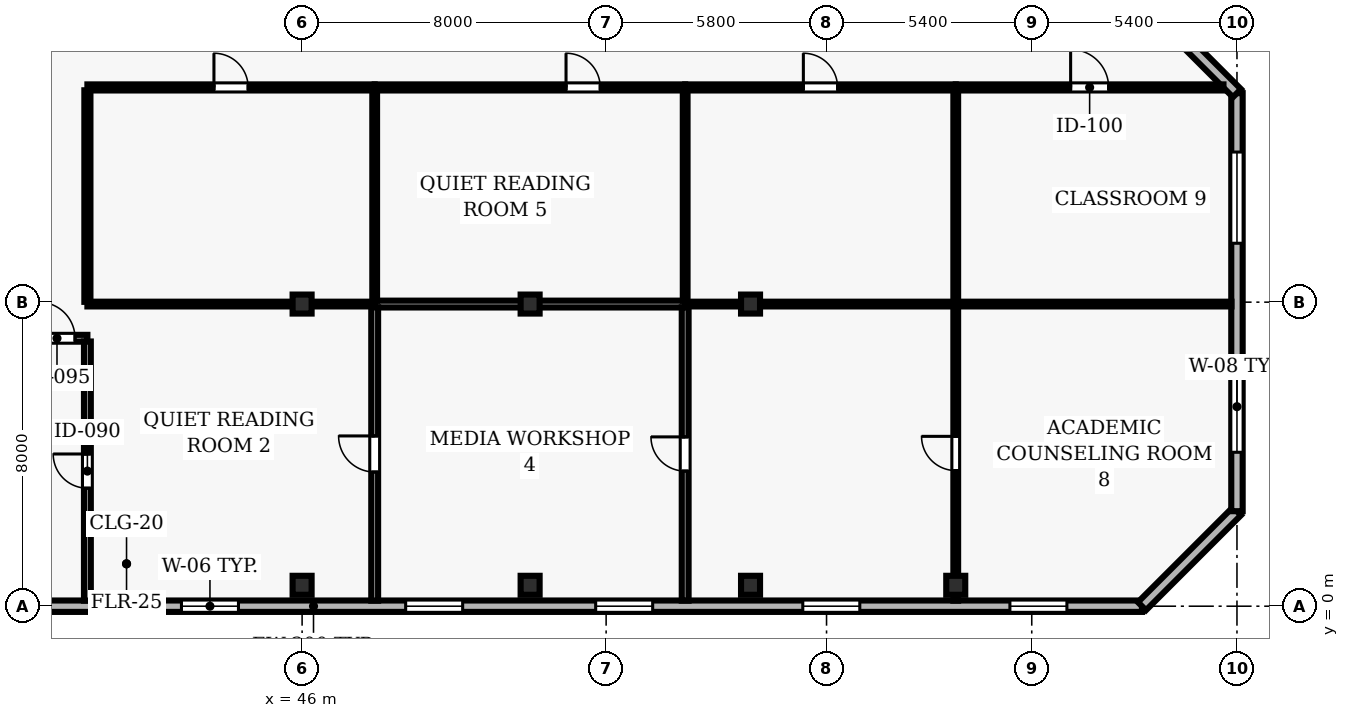
"""IFC4 building model, lengths in metres.
Left out: names, types, materials, properties, quantities, classifications, styles, units other than length and angle.
Written with IfcOpenShell. Run it as: python <this file> out.ifc"""

import sys

from ifc_helpers import new_model, si_unit, direction, frame, frame_2d, origin, origin_2d, place, context, subcontext, project, spatial, rectangle, hollow_rectangle, extrude, element, fill, save


model = new_model("IFC4")
c1 = context("Model", 3, precision=1e-05, world=origin(), true_north=direction((0.0, 1.0)))
c2 = subcontext(c1, "Body", "Model", "MODEL_VIEW")
j1 = project(units=[si_unit("LENGTHUNIT", "METRE"), si_unit("PLANEANGLEUNIT", "RADIAN")], contexts=[c1])
p1 = place(None, origin())
s1 = spatial("IfcSite", under=j1, at=p1, CompositionType="ELEMENT")
p2 = place(p1, origin())
s2 = spatial("IfcBuilding", under=s1, at=p2, CompositionType="ELEMENT")
p3 = place(p2, frame((0.0, 0.0, 122.9)))
s3 = spatial("IfcBuildingStorey", under=s2, at=p3, CompositionType="ELEMENT", Elevation=122.9)
for number, where, z_axis, x_axis in (
    (1, (46.0, 0.55, 0.0), (0.0, 0.0, 1.0), (1.0, 0.0, 0.0)),
    (2, (46.0, 7.95, 0.0), (0.0, 0.0, 1.0), (1.0, 0.0, 0.0)),
    (3, (52.0, 0.55, 0.0), (0.0, 0.0, 1.0), (1.0, 0.0, 0.0)),
    (4, (52.0, 7.95, 0.0), (0.0, 0.0, 1.0), (1.0, 0.0, 0.0)),
    (5, (57.8, 0.55, 0.0), (0.0, 0.0, 1.0), (1.0, 0.0, 0.0)),
    (6, (57.8, 7.95, 0.0), (0.0, 0.0, 1.0), (1.0, 0.0, 0.0)),
    (7, (63.2, 0.55, 0.0), (0.0, 0.0, 1.0), (1.0, 0.0, 0.0)),
):
    element("IfcColumn", number, at=place(p3, frame(where, z_axis=z_axis, x_axis=x_axis)), inside=s3, PredefinedType="COLUMN", context=c2, shape_type="SweptSolid", body=[
        extrude(hollow_rectangle(XDim=0.5, YDim=0.5, WallThickness=0.025, at=origin_2d()), origin(), (0.0, 0.0, 1.0), 3.9),
    ])
p4 = place(p3, frame((24.5, 0.0, 0.0), z_axis=(0.0, 0.0, 1.0), x_axis=(1.0, 0.0, 0.0)))
e8 = element("IfcWall", 8, at=p4, inside=s3, PredefinedType="SOLIDWALL", context=c2, shape_type="SweptSolid", body=[
    extrude(rectangle(XDim=43.6, YDim=0.3, at=frame_2d((21.8, 0.0))), origin(), (0.0, 0.0, 1.0), 3.69),
])
p5 = place(p4, frame((1.975, 0.0, 0.9)))
e9 = element("IfcOpeningElement", 9, at=p5, cuts=e8, PredefinedType="OPENING", context=c2, shape_type="SweptSolid", body=[
    extrude(rectangle(XDim=1.5, YDim=1.8, at=frame_2d((0.75, 0.9))), frame((0.0, 0.16, 0.0), z_axis=(0.0, -1.0, 0.0), x_axis=(1.0, 0.0, 0.0)), (0.0, 0.0, 1.0), 0.32),
])
p6 = place(p4, frame((8.325, 0.0, 0.9)))
e10 = element("IfcOpeningElement", 10, at=p6, cuts=e8, PredefinedType="OPENING", context=c2, shape_type="SweptSolid", body=[
    extrude(rectangle(XDim=1.5, YDim=1.8, at=frame_2d((0.75, 0.9))), frame((0.0, 0.16, 0.0), z_axis=(0.0, -1.0, 0.0), x_axis=(1.0, 0.0, 0.0)), (0.0, 0.0, 1.0), 0.32),
])
p7 = place(p4, frame((18.325, 0.0, 0.9)))
e11 = element("IfcOpeningElement", 11, at=p7, cuts=e8, PredefinedType="OPENING", context=c2, shape_type="SweptSolid", body=[
    extrude(rectangle(XDim=1.5, YDim=1.8, at=frame_2d((0.75, 0.9))), frame((0.0, 0.16, 0.0), z_axis=(0.0, -1.0, 0.0), x_axis=(1.0, 0.0, 0.0)), (0.0, 0.0, 1.0), 0.32),
])
p8 = place(p4, frame((24.225, 0.0, 0.9)))
e12 = element("IfcOpeningElement", 12, at=p8, cuts=e8, PredefinedType="OPENING", context=c2, shape_type="SweptSolid", body=[
    extrude(rectangle(XDim=1.5, YDim=1.8, at=frame_2d((0.75, 0.9))), frame((0.0, 0.16, 0.0), z_axis=(0.0, -1.0, 0.0), x_axis=(1.0, 0.0, 0.0)), (0.0, 0.0, 1.0), 0.32),
])
p9 = place(p4, frame((29.225, 0.0, 0.9)))
e13 = element("IfcOpeningElement", 13, at=p9, cuts=e8, PredefinedType="OPENING", context=c2, shape_type="SweptSolid", body=[
    extrude(rectangle(XDim=1.5, YDim=1.8, at=frame_2d((0.75, 0.9))), frame((0.0, 0.16, 0.0), z_axis=(0.0, -1.0, 0.0), x_axis=(1.0, 0.0, 0.0)), (0.0, 0.0, 1.0), 0.32),
])
p10 = place(p4, frame((34.675, 0.0, 0.9)))
e14 = element("IfcOpeningElement", 14, at=p10, cuts=e8, PredefinedType="OPENING", context=c2, shape_type="SweptSolid", body=[
    extrude(rectangle(XDim=1.5, YDim=1.8, at=frame_2d((0.75, 0.9))), frame((0.0, 0.16, 0.0), z_axis=(0.0, -1.0, 0.0), x_axis=(1.0, 0.0, 0.0)), (0.0, 0.0, 1.0), 0.32),
])
p11 = place(p4, frame((40.125, 0.0, 0.9)))
e15 = element("IfcOpeningElement", 15, at=p11, cuts=e8, PredefinedType="OPENING", context=c2, shape_type="SweptSolid", body=[
    extrude(rectangle(XDim=1.5, YDim=1.8, at=frame_2d((0.75, 0.9))), frame((0.0, 0.16, 0.0), z_axis=(0.0, -1.0, 0.0), x_axis=(1.0, 0.0, 0.0)), (0.0, 0.0, 1.0), 0.32),
])
p12 = place(p3, frame((68.1, 0.0, 0.0), z_axis=(0.0, 0.0, 1.0), x_axis=(0.707106781187, 0.707106781187, 0.0)))
e16 = element("IfcWall", 16, at=p12, inside=s3, PredefinedType="SOLIDWALL", context=c2, shape_type="SweptSolid", body=[
    extrude(rectangle(XDim=3.536, YDim=0.3, at=frame_2d((1.768, 0.0))), origin(), (0.0, 0.0, 1.0), 3.69),
])
p13 = place(p3, frame((70.6, 2.5, 0.0), z_axis=(0.0, 0.0, 1.0), x_axis=(0.0, 1.0, 0.0)))
e17 = element("IfcWall", 17, at=p13, inside=s3, PredefinedType="SOLIDWALL", context=c2, shape_type="SweptSolid", body=[
    extrude(rectangle(XDim=11.0, YDim=0.3, at=frame_2d((5.5, 0.0))), origin(), (0.0, 0.0, 1.0), 3.69),
])
p14 = place(p13, frame((1.55, 0.0, 0.9)))
e18 = element("IfcOpeningElement", 18, at=p14, cuts=e17, PredefinedType="OPENING", context=c2, shape_type="SweptSolid", body=[
    extrude(rectangle(XDim=2.4, YDim=1.8, at=frame_2d((1.2, 0.9))), frame((0.0, 0.16, 0.0), z_axis=(0.0, -1.0, 0.0), x_axis=(1.0, 0.0, 0.0)), (0.0, 0.0, 1.0), 0.32),
])
p15 = place(p13, frame((7.05, 0.0, 0.9)))
e19 = element("IfcOpeningElement", 19, at=p15, cuts=e17, PredefinedType="OPENING", context=c2, shape_type="SweptSolid", body=[
    extrude(rectangle(XDim=2.4, YDim=1.8, at=frame_2d((1.2, 0.9))), frame((0.0, 0.16, 0.0), z_axis=(0.0, -1.0, 0.0), x_axis=(1.0, 0.0, 0.0)), (0.0, 0.0, 1.0), 0.32),
])
p16 = place(p3, frame((70.6, 13.5, 0.0), z_axis=(0.0, 0.0, 1.0), x_axis=(-0.707106781187, 0.707106781187, 0.0)))
e20 = element("IfcWall", 20, at=p16, inside=s3, PredefinedType="SOLIDWALL", context=c2, shape_type="SweptSolid", body=[
    extrude(rectangle(XDim=3.536, YDim=0.3, at=frame_2d((1.768, 0.0))), origin(), (0.0, 0.0, 1.0), 3.69),
])
p17 = place(p3, frame((38.05, 7.05, 0.0), z_axis=(0.0, 0.0, 1.0), x_axis=(1.0, 0.0, 0.0)))
e21 = element("IfcWall", 21, at=p17, inside=s3, PredefinedType="PARTITIONING", context=c2, shape_type="SweptSolid", body=[
    extrude(rectangle(XDim=2.3, YDim=0.18, at=frame_2d((1.15, 0.0))), origin(), (0.0, 0.0, 1.0), 3.69),
])
p18 = place(p17, frame((1.025, 0.0, 0.0)))
e22 = element("IfcOpeningElement", 22, at=p18, cuts=e21, PredefinedType="OPENING", context=c2, shape_type="SweptSolid", body=[
    extrude(rectangle(XDim=0.95, YDim=2.1, at=frame_2d((0.475, 1.05))), frame((0.0, 0.1, 0.0), z_axis=(0.0, -1.0, 0.0), x_axis=(1.0, 0.0, 0.0)), (0.0, 0.0, 1.0), 0.2),
])
p19 = place(p3, frame((40.35, 13.65, 0.0), z_axis=(0.0, 0.0, 1.0), x_axis=(1.0, 0.0, 0.0)))
e23 = element("IfcWall", 23, at=p19, inside=s3, PredefinedType="PARTITIONING", context=c2, shape_type="SweptSolid", body=[
    extrude(rectangle(XDim=7.56, YDim=0.16, at=frame_2d((3.78, 0.0))), origin(), (0.0, 0.0, 1.0), 3.69),
])
p20 = place(p19, frame((3.33, 0.0, 0.0)))
e24 = element("IfcOpeningElement", 24, at=p20, cuts=e23, PredefinedType="OPENING", context=c2, shape_type="SweptSolid", body=[
    extrude(rectangle(XDim=0.9, YDim=2.1, at=frame_2d((0.45, 1.05))), frame((0.0, 0.09, 0.0), z_axis=(0.0, -1.0, 0.0), x_axis=(1.0, 0.0, 0.0)), (0.0, 0.0, 1.0), 0.18),
])
p21 = place(p3, frame((47.91, 7.95, 0.0), z_axis=(0.0, 0.0, 1.0), x_axis=(-1.0, 0.0, 0.0)))
e25 = element("IfcWall", 25, at=p21, inside=s3, PredefinedType="PARTITIONING", context=c2, shape_type="SweptSolid", body=[
    extrude(rectangle(XDim=7.56, YDim=0.125, at=frame_2d((3.78, 0.0))), origin(), (0.0, 0.0, 1.0), 3.073),
])
p22 = place(p3, frame((47.91, 13.65, 0.0), z_axis=(0.0, 0.0, 1.0), x_axis=(1.0, 0.0, 0.0)))
e26 = element("IfcWall", 26, at=p22, inside=s3, PredefinedType="PARTITIONING", context=c2, shape_type="SweptSolid", body=[
    extrude(rectangle(XDim=8.17, YDim=0.16, at=frame_2d((4.085, 0.0))), origin(), (0.0, 0.0, 1.0), 3.69),
])
p23 = place(p22, frame((5.035, 0.0, 0.0)))
e27 = element("IfcOpeningElement", 27, at=p23, cuts=e26, PredefinedType="OPENING", context=c2, shape_type="SweptSolid", body=[
    extrude(rectangle(XDim=0.9, YDim=2.1, at=frame_2d((0.45, 1.05))), frame((0.0, 0.09, 0.0), z_axis=(0.0, -1.0, 0.0), x_axis=(1.0, 0.0, 0.0)), (0.0, 0.0, 1.0), 0.18),
])
p24 = place(p3, frame((56.08, 7.95, 0.0), z_axis=(0.0, 0.0, 1.0), x_axis=(-1.0, 0.0, 0.0)))
e28 = element("IfcWall", 28, at=p24, inside=s3, PredefinedType="PARTITIONING", context=c2, shape_type="SweptSolid", body=[
    extrude(rectangle(XDim=8.17, YDim=0.18, at=frame_2d((4.085, 0.0))), origin(), (0.0, 0.0, 1.0), 3.073),
])
p25 = place(p3, frame((56.08, 13.65, 0.0), z_axis=(0.0, 0.0, 1.0), x_axis=(1.0, 0.0, 0.0)))
e29 = element("IfcWall", 29, at=p25, inside=s3, PredefinedType="PARTITIONING", context=c2, shape_type="SweptSolid", body=[
    extrude(rectangle(XDim=7.12, YDim=0.16, at=frame_2d((3.56, 0.0))), origin(), (0.0, 0.0, 1.0), 3.69),
])
p26 = place(p25, frame((3.11, 0.0, 0.0)))
e30 = element("IfcOpeningElement", 30, at=p26, cuts=e29, PredefinedType="OPENING", context=c2, shape_type="SweptSolid", body=[
    extrude(rectangle(XDim=0.9, YDim=2.1, at=frame_2d((0.45, 1.05))), frame((0.0, 0.09, 0.0), z_axis=(0.0, -1.0, 0.0), x_axis=(1.0, 0.0, 0.0)), (0.0, 0.0, 1.0), 0.18),
])
p27 = place(p3, frame((63.2, 7.95, 0.0), z_axis=(0.0, 0.0, 1.0), x_axis=(-1.0, 0.0, 0.0)))
e31 = element("IfcWall", 31, at=p27, inside=s3, PredefinedType="PARTITIONING", context=c2, shape_type="SweptSolid", body=[
    extrude(rectangle(XDim=7.12, YDim=0.125, at=frame_2d((3.56, 0.0))), origin(), (0.0, 0.0, 1.0), 3.073),
])
p28 = place(p3, frame((63.2, 13.65, 0.0), z_axis=(0.0, 0.0, 1.0), x_axis=(1.0, 0.0, 0.0)))
e32 = element("IfcWall", 32, at=p28, inside=s3, PredefinedType="PARTITIONING", context=c2, shape_type="SweptSolid", body=[
    extrude(rectangle(XDim=7.045, YDim=0.16, at=frame_2d((3.522, 0.0))), origin(), (0.0, 0.0, 1.0), 3.69),
])
p29 = place(p28, frame((3.023, 0.0, 0.0)))
e33 = element("IfcOpeningElement", 33, at=p29, cuts=e32, PredefinedType="OPENING", context=c2, shape_type="SweptSolid", body=[
    extrude(rectangle(XDim=1.0, YDim=2.1, at=frame_2d((0.5, 1.05))), frame((0.0, 0.09, 0.0), z_axis=(0.0, -1.0, 0.0), x_axis=(1.0, 0.0, 0.0)), (0.0, 0.0, 1.0), 0.18),
])
p30 = place(p3, frame((70.455, 7.95, 0.0), z_axis=(0.0, 0.0, 1.0), x_axis=(-1.0, 0.0, 0.0)))
e34 = element("IfcWall", 34, at=p30, inside=s3, PredefinedType="PARTITIONING", context=c2, shape_type="SweptSolid", body=[
    extrude(rectangle(XDim=7.255, YDim=0.125, at=frame_2d((3.627, 0.0))), origin(), (0.0, 0.0, 1.0), 3.69),
])
p31 = place(p3, frame((40.35, 0.145, 0.0), z_axis=(0.0, 0.0, 1.0), x_axis=(0.0, 1.0, 0.0)))
e35 = element("IfcWall", 35, at=p31, inside=s3, PredefinedType="PARTITIONING", context=c2, shape_type="SweptSolid", body=[
    extrude(rectangle(XDim=6.82, YDim=0.18, at=frame_2d((3.41, 0.0))), origin(), (0.0, 0.0, 1.0), 3.69),
])
p32 = place(p31, frame((2.96, 0.0, 0.0)))
e36 = element("IfcOpeningElement", 36, at=p32, cuts=e35, PredefinedType="OPENING", context=c2, shape_type="SweptSolid", body=[
    extrude(rectangle(XDim=0.9, YDim=2.1, at=frame_2d((0.45, 1.05))), frame((0.0, 0.1, 0.0), z_axis=(0.0, -1.0, 0.0), x_axis=(1.0, 0.0, 0.0)), (0.0, 0.0, 1.0), 0.2),
])
p33 = place(p3, frame((40.35, 8.008, 0.0), z_axis=(0.0, 0.0, 1.0), x_axis=(0.0, 1.0, 0.0)))
e37 = element("IfcWall", 37, at=p33, inside=s3, PredefinedType="PARTITIONING", context=c2, shape_type="SweptSolid", body=[
    extrude(rectangle(XDim=5.567, YDim=0.16, at=frame_2d((2.783, 0.0))), origin(), (0.0, 0.0, 1.0), 3.69),
])
p34 = place(p3, frame((47.91, 0.145, 0.0), z_axis=(0.0, 0.0, 1.0), x_axis=(0.0, 1.0, 0.0)))
e38 = element("IfcWall", 38, at=p34, inside=s3, PredefinedType="PARTITIONING", context=c2, shape_type="SweptSolid", body=[
    extrude(rectangle(XDim=7.72, YDim=0.18, at=frame_2d((3.86, 0.0))), origin(), (0.0, 0.0, 1.0), 3.69),
])
p35 = place(p34, frame((3.385, 0.0, 0.0)))
e39 = element("IfcOpeningElement", 39, at=p35, cuts=e38, PredefinedType="OPENING", context=c2, shape_type="SweptSolid", body=[
    extrude(rectangle(XDim=0.95, YDim=2.1, at=frame_2d((0.475, 1.05))), frame((0.0, 0.1, 0.0), z_axis=(0.0, -1.0, 0.0), x_axis=(1.0, 0.0, 0.0)), (0.0, 0.0, 1.0), 0.2),
])
p36 = place(p3, frame((47.91, 8.035, 0.0), z_axis=(0.0, 0.0, 1.0), x_axis=(0.0, 1.0, 0.0)))
e40 = element("IfcWall", 40, at=p36, inside=s3, PredefinedType="PARTITIONING", context=c2, shape_type="SweptSolid", body=[
    extrude(rectangle(XDim=5.54, YDim=0.125, at=frame_2d((2.77, 0.0))), origin(), (0.0, 0.0, 1.0), 3.69),
])
p37 = place(p3, frame((56.08, 0.145, 0.0), z_axis=(0.0, 0.0, 1.0), x_axis=(0.0, 1.0, 0.0)))
e41 = element("IfcWall", 41, at=p37, inside=s3, PredefinedType="PARTITIONING", context=c2, shape_type="SweptSolid", body=[
    extrude(rectangle(XDim=7.72, YDim=0.18, at=frame_2d((3.86, 0.0))), origin(), (0.0, 0.0, 1.0), 3.69),
])
p38 = place(p37, frame((3.41, 0.0, 0.0)))
e42 = element("IfcOpeningElement", 42, at=p38, cuts=e41, PredefinedType="OPENING", context=c2, shape_type="SweptSolid", body=[
    extrude(rectangle(XDim=0.9, YDim=2.1, at=frame_2d((0.45, 1.05))), frame((0.0, 0.1, 0.0), z_axis=(0.0, -1.0, 0.0), x_axis=(1.0, 0.0, 0.0)), (0.0, 0.0, 1.0), 0.2),
])
p39 = place(p3, frame((56.08, 8.035, 0.0), z_axis=(0.0, 0.0, 1.0), x_axis=(0.0, 1.0, 0.0)))
e43 = element("IfcWall", 43, at=p39, inside=s3, PredefinedType="PARTITIONING", context=c2, shape_type="SweptSolid", body=[
    extrude(rectangle(XDim=5.54, YDim=0.125, at=frame_2d((2.77, 0.0))), origin(), (0.0, 0.0, 1.0), 3.69),
])
p40 = place(p3, frame((63.2, 0.145, 0.0), z_axis=(0.0, 0.0, 1.0), x_axis=(0.0, 1.0, 0.0)))
e44 = element("IfcWall", 44, at=p40, inside=s3, PredefinedType="PARTITIONING", context=c2, shape_type="SweptSolid", body=[
    extrude(rectangle(XDim=7.748, YDim=0.125, at=frame_2d((3.874, 0.0))), origin(), (0.0, 0.0, 1.0), 3.073),
])
p41 = place(p40, frame((3.424, 0.0, 0.0)))
e45 = element("IfcOpeningElement", 45, at=p41, cuts=e44, PredefinedType="OPENING", context=c2, shape_type="SweptSolid", body=[
    extrude(rectangle(XDim=0.9, YDim=2.1, at=frame_2d((0.45, 1.05))), frame((0.0, 0.073, 0.0), z_axis=(0.0, -1.0, 0.0), x_axis=(1.0, 0.0, 0.0)), (0.0, 0.0, 1.0), 0.145),
])
p42 = place(p3, frame((63.2, 8.008, 0.0), z_axis=(0.0, 0.0, 1.0), x_axis=(0.0, 1.0, 0.0)))
e46 = element("IfcWall", 46, at=p42, inside=s3, PredefinedType="PARTITIONING", context=c2, shape_type="SweptSolid", body=[
    extrude(rectangle(XDim=5.567, YDim=0.125, at=frame_2d((2.783, 0.0))), origin(), (0.0, 0.0, 1.0), 3.073),
])
p43 = place(p7, origin())
e47 = element("IfcWindow", 47, at=p43, inside=s3, PartitioningType="SINGLE_PANEL", PredefinedType="WINDOW", context=c2, shape_type="SweptSolid", body=[
    extrude(rectangle(XDim=1.5, YDim=1.8, at=frame_2d((0.75, 0.9))), frame((0.0, 0.03, 0.0), z_axis=(0.0, -1.0, 0.0), x_axis=(1.0, 0.0, 0.0)), (0.0, 0.0, 1.0), 0.06),
])
fill(e11, e47)
p44 = place(p8, origin())
e48 = element("IfcWindow", 48, at=p44, inside=s3, PartitioningType="SINGLE_PANEL", PredefinedType="WINDOW", context=c2, shape_type="SweptSolid", body=[
    extrude(rectangle(XDim=1.5, YDim=1.8, at=frame_2d((0.75, 0.9))), frame((0.0, 0.03, 0.0), z_axis=(0.0, -1.0, 0.0), x_axis=(1.0, 0.0, 0.0)), (0.0, 0.0, 1.0), 0.06),
])
fill(e12, e48)
p45 = place(p9, origin())
e49 = element("IfcWindow", 49, at=p45, inside=s3, PartitioningType="SINGLE_PANEL", PredefinedType="WINDOW", context=c2, shape_type="SweptSolid", body=[
    extrude(rectangle(XDim=1.5, YDim=1.8, at=frame_2d((0.75, 0.9))), frame((0.0, 0.03, 0.0), z_axis=(0.0, -1.0, 0.0), x_axis=(1.0, 0.0, 0.0)), (0.0, 0.0, 1.0), 0.06),
])
fill(e13, e49)
p46 = place(p10, origin())
e50 = element("IfcWindow", 50, at=p46, inside=s3, PartitioningType="SINGLE_PANEL", PredefinedType="WINDOW", context=c2, shape_type="SweptSolid", body=[
    extrude(rectangle(XDim=1.5, YDim=1.8, at=frame_2d((0.75, 0.9))), frame((0.0, 0.03, 0.0), z_axis=(0.0, -1.0, 0.0), x_axis=(1.0, 0.0, 0.0)), (0.0, 0.0, 1.0), 0.06),
])
fill(e14, e50)
p47 = place(p11, origin())
e51 = element("IfcWindow", 51, at=p47, inside=s3, PartitioningType="SINGLE_PANEL", PredefinedType="WINDOW", context=c2, shape_type="SweptSolid", body=[
    extrude(rectangle(XDim=1.5, YDim=1.8, at=frame_2d((0.75, 0.9))), frame((0.0, 0.03, 0.0), z_axis=(0.0, -1.0, 0.0), x_axis=(1.0, 0.0, 0.0)), (0.0, 0.0, 1.0), 0.06),
])
fill(e15, e51)
p48 = place(p14, origin())
e52 = element("IfcWindow", 52, at=p48, inside=s3, PartitioningType="SINGLE_PANEL", PredefinedType="WINDOW", context=c2, shape_type="SweptSolid", body=[
    extrude(rectangle(XDim=2.4, YDim=1.8, at=frame_2d((1.2, 0.9))), frame((0.0, 0.03, 0.0), z_axis=(0.0, -1.0, 0.0), x_axis=(1.0, 0.0, 0.0)), (0.0, 0.0, 1.0), 0.06),
])
fill(e18, e52)
p49 = place(p15, origin())
e53 = element("IfcWindow", 53, at=p49, inside=s3, PartitioningType="SINGLE_PANEL", PredefinedType="WINDOW", context=c2, shape_type="SweptSolid", body=[
    extrude(rectangle(XDim=2.4, YDim=1.8, at=frame_2d((1.2, 0.9))), frame((0.0, 0.03, 0.0), z_axis=(0.0, -1.0, 0.0), x_axis=(1.0, 0.0, 0.0)), (0.0, 0.0, 1.0), 0.06),
])
fill(e19, e53)
p50 = place(p18, origin())
e54 = element("IfcDoor", 54, at=p50, inside=s3, OperationType="SINGLE_SWING_LEFT", PredefinedType="DOOR", context=c2, shape_type="SweptSolid", body=[
    extrude(rectangle(XDim=0.95, YDim=2.1, at=frame_2d((0.475, 1.05))), frame((0.0, 0.025, 0.0), z_axis=(0.0, -1.0, 0.0), x_axis=(1.0, 0.0, 0.0)), (0.0, 0.0, 1.0), 0.05),
])
fill(e22, e54)
p51 = place(p32, origin())
e55 = element("IfcDoor", 55, at=p51, inside=s3, OperationType="SINGLE_SWING_RIGHT", PredefinedType="DOOR", context=c2, shape_type="SweptSolid", body=[
    extrude(rectangle(XDim=0.9, YDim=2.1, at=frame_2d((0.45, 1.05))), frame((0.0, 0.025, 0.0), z_axis=(0.0, -1.0, 0.0), x_axis=(1.0, 0.0, 0.0)), (0.0, 0.0, 1.0), 0.05),
])
fill(e36, e55)
p52 = place(p20, origin())
e56 = element("IfcDoor", 56, at=p52, inside=s3, OperationType="SINGLE_SWING_LEFT", PredefinedType="DOOR", context=c2, shape_type="SweptSolid", body=[
    extrude(rectangle(XDim=0.9, YDim=2.1, at=frame_2d((0.45, 1.05))), frame((0.0, 0.025, 0.0), z_axis=(0.0, -1.0, 0.0), x_axis=(1.0, 0.0, 0.0)), (0.0, 0.0, 1.0), 0.05),
])
fill(e24, e56)
p53 = place(p35, origin())
e57 = element("IfcDoor", 57, at=p53, inside=s3, OperationType="SINGLE_SWING_RIGHT", PredefinedType="DOOR", context=c2, shape_type="SweptSolid", body=[
    extrude(rectangle(XDim=0.95, YDim=2.1, at=frame_2d((0.475, 1.05))), frame((0.0, 0.025, 0.0), z_axis=(0.0, -1.0, 0.0), x_axis=(1.0, 0.0, 0.0)), (0.0, 0.0, 1.0), 0.05),
])
fill(e39, e57)
p54 = place(p23, origin())
e58 = element("IfcDoor", 58, at=p54, inside=s3, OperationType="SINGLE_SWING_LEFT", PredefinedType="DOOR", context=c2, shape_type="SweptSolid", body=[
    extrude(rectangle(XDim=0.9, YDim=2.1, at=frame_2d((0.45, 1.05))), frame((0.0, 0.025, 0.0), z_axis=(0.0, -1.0, 0.0), x_axis=(1.0, 0.0, 0.0)), (0.0, 0.0, 1.0), 0.05),
])
fill(e27, e58)
p55 = place(p38, origin())
e59 = element("IfcDoor", 59, at=p55, inside=s3, OperationType="SINGLE_SWING_RIGHT", PredefinedType="DOOR", context=c2, shape_type="SweptSolid", body=[
    extrude(rectangle(XDim=0.9, YDim=2.1, at=frame_2d((0.45, 1.05))), frame((0.0, 0.025, 0.0), z_axis=(0.0, -1.0, 0.0), x_axis=(1.0, 0.0, 0.0)), (0.0, 0.0, 1.0), 0.05),
])
fill(e42, e59)
p56 = place(p26, origin())
e60 = element("IfcDoor", 60, at=p56, inside=s3, OperationType="SINGLE_SWING_LEFT", PredefinedType="DOOR", context=c2, shape_type="SweptSolid", body=[
    extrude(rectangle(XDim=0.9, YDim=2.1, at=frame_2d((0.45, 1.05))), frame((0.0, 0.025, 0.0), z_axis=(0.0, -1.0, 0.0), x_axis=(1.0, 0.0, 0.0)), (0.0, 0.0, 1.0), 0.05),
])
fill(e30, e60)
p57 = place(p41, origin())
e61 = element("IfcDoor", 61, at=p57, inside=s3, OperationType="SINGLE_SWING_RIGHT", PredefinedType="DOOR", context=c2, shape_type="SweptSolid", body=[
    extrude(rectangle(XDim=0.9, YDim=2.1, at=frame_2d((0.45, 1.05))), frame((0.0, 0.025, 0.0), z_axis=(0.0, -1.0, 0.0), x_axis=(1.0, 0.0, 0.0)), (0.0, 0.0, 1.0), 0.05),
])
fill(e45, e61)
p58 = place(p29, origin())
e62 = element("IfcDoor", 62, at=p58, inside=s3, OperationType="SINGLE_SWING_LEFT", PredefinedType="DOOR", context=c2, shape_type="SweptSolid", body=[
    extrude(rectangle(XDim=1.0, YDim=2.1, at=frame_2d((0.5, 1.05))), frame((0.0, 0.025, 0.0), z_axis=(0.0, -1.0, 0.0), x_axis=(1.0, 0.0, 0.0)), (0.0, 0.0, 1.0), 0.05),
])
fill(e33, e62)
save(model, sys.argv[1])
